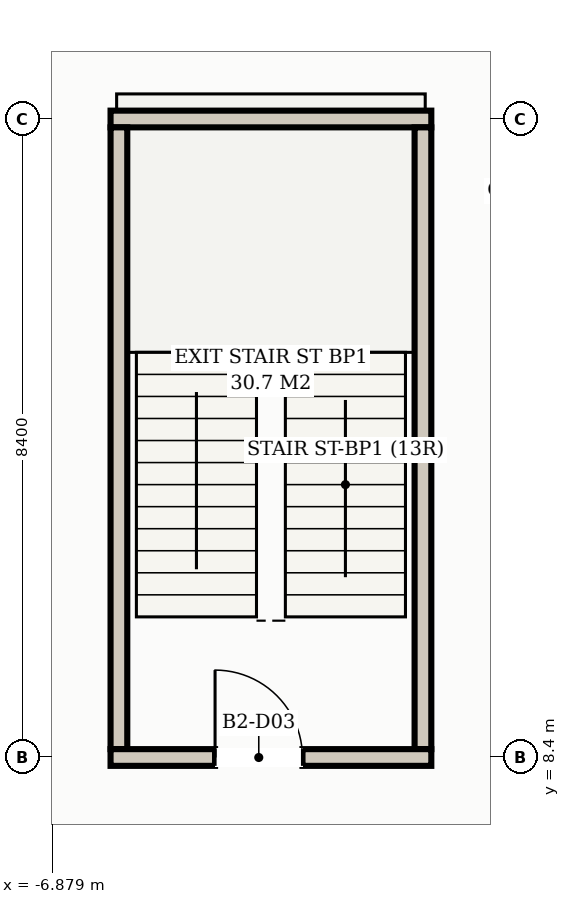
"""IFC4 building model, lengths in metres.
Left out: names, types, materials, properties, quantities, classifications, styles, units other than length and angle.
Written with IfcOpenShell. Run it as: python <this file> out.ifc"""

import sys

from ifc_helpers import new_model, si_unit, direction, frame, frame_2d, origin, place, context, subcontext, project, spatial, rectangle, extrude, element, fill, save


model = new_model("IFC4")
c1 = context("Model", 3, precision=1e-05, world=origin(), true_north=direction((0.0, 1.0)))
c2 = subcontext(c1, "Body", "Model", "MODEL_VIEW")
j1 = project(units=[si_unit("LENGTHUNIT", "METRE"), si_unit("PLANEANGLEUNIT", "RADIAN")], contexts=[c1])
p1 = place(None, origin())
s1 = spatial("IfcSite", under=j1, at=p1, CompositionType="ELEMENT")
p2 = place(p1, origin())
s2 = spatial("IfcBuilding", under=s1, at=p2, CompositionType="ELEMENT")
p3 = place(p2, frame((0.0, 0.0, -8.4)))
s3 = spatial("IfcBuildingStorey", under=s2, at=p3, CompositionType="ELEMENT", Elevation=-8.4)
p4 = place(p3, frame((-6.11, 16.8, 0.0), z_axis=(0.0, 0.0, 1.0), x_axis=(1.0, 0.0, 0.0)))
e1 = element("IfcWall", 1, at=p4, inside=s3, PredefinedType="SHEAR", context=c2, shape_type="SweptSolid", body=[
    extrude(rectangle(XDim=4.22, YDim=0.22, at=frame_2d((2.11, 0.0))), origin(), (0.0, 0.0, 1.0), 3.92),
])
for number, where, z_axis, x_axis in (
    (2, (-6.0, 8.51, 0.0), (0.0, 0.0, 1.0), (0.0, 1.0, 0.0)),
    (3, (-2.0, 8.51, 0.0), (0.0, 0.0, 1.0), (0.0, 1.0, 0.0)),
):
    element("IfcWall", number, at=place(p3, frame(where, z_axis=z_axis, x_axis=x_axis)), inside=s3, PredefinedType="SHEAR", context=c2, shape_type="SweptSolid", body=[
        extrude(rectangle(XDim=8.18, YDim=0.22, at=frame_2d((4.09, 0.0))), origin(), (0.0, 0.0, 1.0), 3.92),
    ])
p5 = place(p3, frame((-6.11, 8.4, 0.0), z_axis=(0.0, 0.0, 1.0), x_axis=(1.0, 0.0, 0.0)))
e4 = element("IfcWall", 4, at=p5, inside=s3, PredefinedType="SHEAR", context=c2, shape_type="SweptSolid", body=[
    extrude(rectangle(XDim=4.22, YDim=0.22, at=frame_2d((2.11, 0.0))), origin(), (0.0, 0.0, 1.0), 3.92),
])
p6 = place(p5, frame((1.375, 0.0, 0.0)))
e5 = element("IfcOpeningElement", 5, at=p6, cuts=e4, PredefinedType="OPENING", context=c2, shape_type="SweptSolid", body=[
    extrude(rectangle(XDim=1.15, YDim=2.2, at=frame_2d((0.575, 1.1))), frame((0.0, 0.12, 0.0), z_axis=(0.0, -1.0, 0.0), x_axis=(1.0, 0.0, 0.0)), (0.0, 0.0, 1.0), 0.24),
])
p7 = place(p6, origin())
e6 = element("IfcDoor", 6, at=p7, inside=s3, OperationType="SINGLE_SWING_LEFT", PredefinedType="DOOR", context=c2, shape_type="SweptSolid", body=[
    extrude(rectangle(XDim=1.15, YDim=2.2, at=frame_2d((0.575, 1.1))), frame((0.0, 0.025, 0.0), z_axis=(0.0, -1.0, 0.0), x_axis=(1.0, 0.0, 0.0)), (0.0, 0.0, 1.0), 0.05),
])
fill(e5, e6)
save(model, sys.argv[1])
